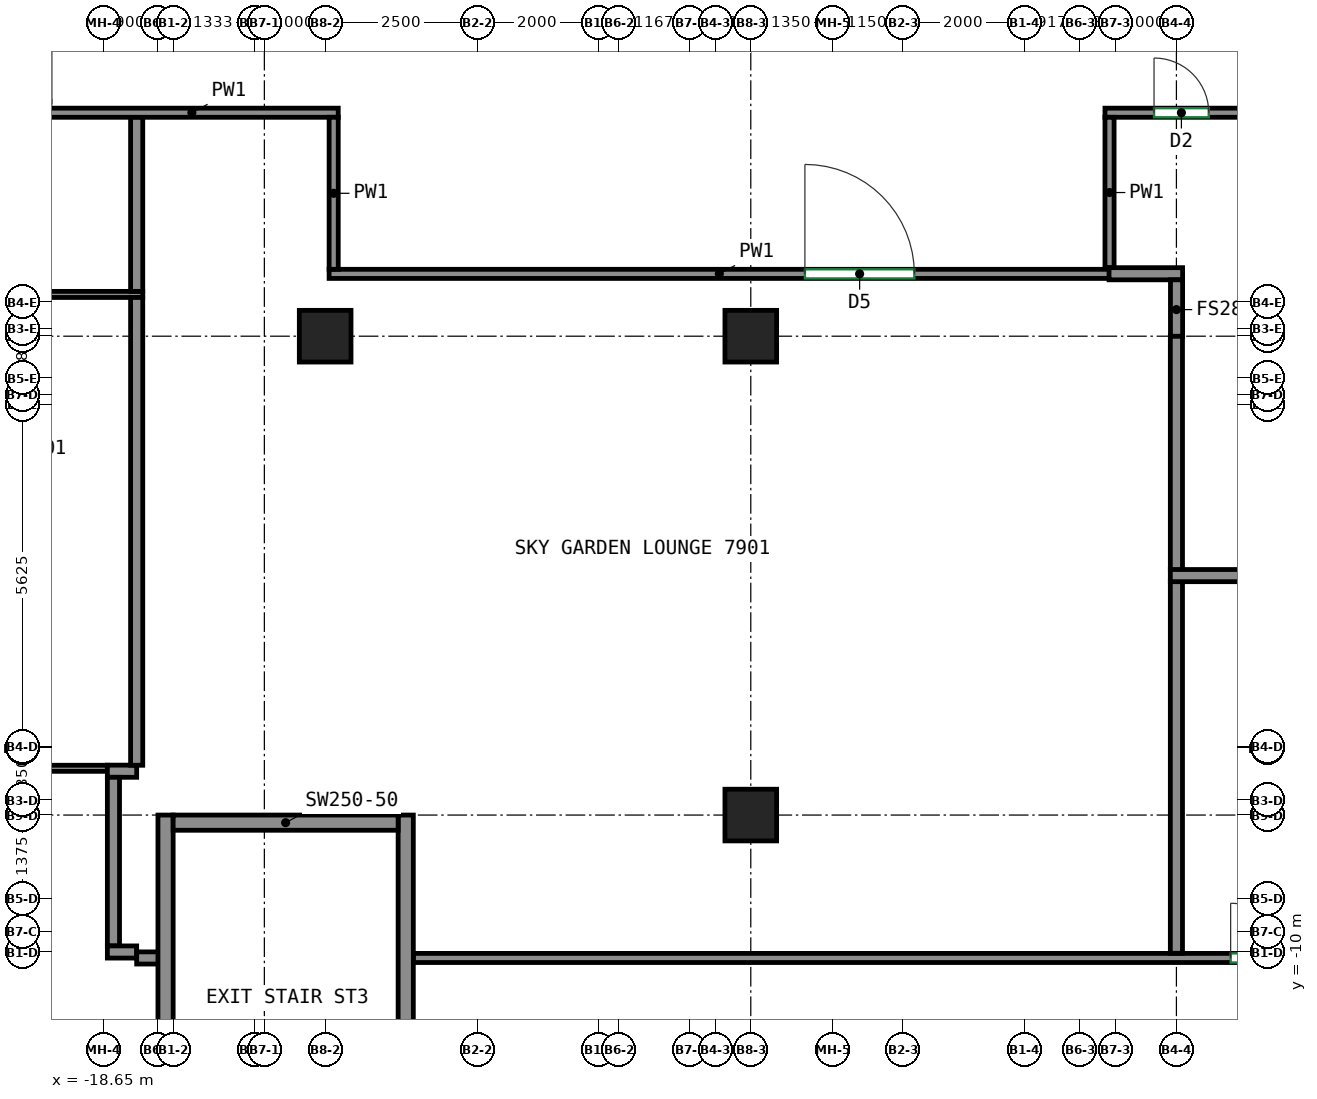
"""IFC4 building model, lengths in metres.
Left out: names, types, materials, properties, quantities, classifications, styles, units other than length and angle.
Written with IfcOpenShell. Run it as: python <this file> out.ifc"""

import sys

from ifc_helpers import new_model, si_unit, direction, frame, frame_2d, origin, origin_2d, place, context, subcontext, project, spatial, rectangle, extrude, source, transform, mapped, element, fill, save


model = new_model("IFC4")
c1 = context("Model", 3, precision=1e-05, world=origin(), true_north=direction((0.0, 1.0)))
c2 = subcontext(c1, "Body", "Model", "MODEL_VIEW")
j1 = project(units=[si_unit("LENGTHUNIT", "METRE"), si_unit("PLANEANGLEUNIT", "RADIAN")], contexts=[c1])
p1 = place(None, origin())
s1 = spatial("IfcSite", under=j1, at=p1, CompositionType="ELEMENT")
p2 = place(p1, origin())
s2 = spatial("IfcBuilding", under=s1, at=p2, CompositionType="ELEMENT")
p3 = place(p2, frame((0.0, 0.0, 315.4)))
s3 = spatial("IfcBuildingStorey", under=s2, at=p3, CompositionType="ELEMENT", Elevation=315.4)
m1 = source(origin(), c2, "Body", "SweptSolid", [
    extrude(rectangle(XDim=0.85, YDim=0.85, at=origin_2d()), origin(), (0.0, 0.0, 1.0), 3.0),
])
for number, where, z_axis, x_axis in (
    (1, (-15.0, 0.125, 0.0), (0.0, 0.0, 1.0), (1.0, 0.0, 0.0)),
    (2, (-8.0, -7.75, 0.0), (0.0, 0.0, 1.0), (1.0, 0.0, 0.0)),
    (3, (-8.0, 0.125, 0.0), (0.0, 0.0, 1.0), (1.0, 0.0, 0.0)),
):
    element("IfcColumn", number, at=place(p3, frame(where, z_axis=z_axis, x_axis=x_axis)), inside=s3, PredefinedType="COLUMN", context=c2, shape_type="MappedRepresentation", body=[
        mapped(m1, transform((0.0, 0.0, 0.0))),
    ])
m2 = source(origin(), c2, "Body", "SweptSolid", [
    extrude(rectangle(XDim=8.0, YDim=0.25, at=frame_2d((4.0, 0.0))), origin(), (0.0, 0.0, 1.0), 3.0),
])
for number, where, z_axis, x_axis in (
    (4, (-17.625, -15.75, 0.0), (0.0, 0.0, 1.0), (0.0, 1.0, 0.0)),
    (5, (-13.675, -15.75, 0.0), (0.0, 0.0, 1.0), (0.0, 1.0, 0.0)),
):
    element("IfcWall", number, at=place(p3, frame(where, z_axis=z_axis, x_axis=x_axis)), inside=s3, PredefinedType="SHEAR", context=c2, shape_type="MappedRepresentation", body=[
        mapped(m2, transform((0.0, 0.0, 0.0))),
    ])
m3 = source(origin(), c2, "Body", "SweptSolid", [
    extrude(rectangle(XDim=3.7, YDim=0.25, at=frame_2d((1.85, 0.0))), origin(), (0.0, 0.0, 1.0), 3.0),
])
p4 = place(p3, frame((-17.5, -7.875, 0.0), z_axis=(0.0, 0.0, 1.0), x_axis=(1.0, 0.0, 0.0)))
e6 = element("IfcWall", 6, at=p4, inside=s3, PredefinedType="SHEAR", context=c2, shape_type="MappedRepresentation", body=[
    mapped(m3, transform((0.0, 0.0, 0.0))),
])
p5 = place(p3, frame((-19.6, 3.8, 0.0), z_axis=(0.0, 0.0, 1.0), x_axis=(1.0, 0.0, 0.0)))
e7 = element("IfcWall", 7, at=p5, inside=s3, PredefinedType="PARTITIONING", context=c2, shape_type="SweptSolid", body=[
    extrude(rectangle(XDim=4.815, YDim=0.15, at=frame_2d((2.408, 0.0))), origin(), (0.0, 0.0, 1.0), 3.0),
])
p6 = place(p3, frame((-14.935, 1.15, 0.0), z_axis=(0.0, 0.0, 1.0), x_axis=(1.0, 0.0, 0.0)))
e8 = element("IfcWall", 8, at=p6, inside=s3, PredefinedType="PARTITIONING", context=c2, shape_type="SweptSolid", body=[
    extrude(rectangle(XDim=12.835, YDim=0.15, at=frame_2d((6.417, 0.0))), origin(), (0.0, 0.0, 1.0), 3.0),
])
p7 = place(p6, frame((7.825, 0.0, 0.0)))
e9 = element("IfcOpeningElement", 9, at=p7, cuts=e8, PredefinedType="OPENING", context=c2, shape_type="SweptSolid", body=[
    extrude(rectangle(XDim=1.8, YDim=2.1, at=frame_2d((0.9, 1.05))), frame((0.0, 0.085, 0.0), z_axis=(0.0, -1.0, 0.0), x_axis=(1.0, 0.0, 0.0)), (0.0, 0.0, 1.0), 0.17),
])
p8 = place(p3, frame((-14.86, 3.725, 0.0), z_axis=(0.0, 0.0, 1.0), x_axis=(0.0, -1.0, 0.0)))
e10 = element("IfcWall", 10, at=p8, inside=s3, PredefinedType="PARTITIONING", context=c2, shape_type="SweptSolid", body=[
    extrude(rectangle(XDim=2.5, YDim=0.15, at=frame_2d((1.25, 0.0))), origin(), (0.0, 0.0, 1.0), 3.0),
])
p9 = place(p3, frame((-13.55, -10.1, 0.0), z_axis=(0.0, 0.0, 1.0), x_axis=(1.0, 0.0, 0.0)))
e11 = element("IfcWall", 11, at=p9, inside=s3, PredefinedType="PARTITIONING", context=c2, shape_type="SweptSolid", body=[
    extrude(rectangle(XDim=30.65, YDim=0.15, at=frame_2d((15.325, 0.0))), origin(), (0.0, 0.0, 1.0), 3.0),
])
p10 = place(p9, frame((13.442, 0.0, 0.0)))
e12 = element("IfcOpeningElement", 12, at=p10, cuts=e11, PredefinedType="OPENING", context=c2, shape_type="SweptSolid", body=[
    extrude(rectangle(XDim=0.9, YDim=2.1, at=frame_2d((0.45, 1.05))), frame((0.0, 0.085, 0.0), z_axis=(0.0, -1.0, 0.0), x_axis=(1.0, 0.0, 0.0)), (0.0, 0.0, 1.0), 0.17),
])
p11 = place(p9, frame((25.452, 0.0, 0.0)))
e13 = element("IfcOpeningElement", 13, at=p11, cuts=e11, PredefinedType="OPENING", context=c2, shape_type="SweptSolid", body=[
    extrude(rectangle(XDim=0.9, YDim=2.1, at=frame_2d((0.45, 1.05))), frame((0.0, 0.085, 0.0), z_axis=(0.0, -1.0, 0.0), x_axis=(1.0, 0.0, 0.0)), (0.0, 0.0, 1.0), 0.17),
])
p12 = place(p3, frame((-2.175, 3.8, 0.0), z_axis=(0.0, 0.0, 1.0), x_axis=(1.0, 0.0, 0.0)))
e14 = element("IfcWall", 14, at=p12, inside=s3, PredefinedType="PARTITIONING", context=c2, shape_type="SweptSolid", body=[
    extrude(rectangle(XDim=9.13, YDim=0.15, at=frame_2d((4.565, 0.0))), origin(), (0.0, 0.0, 1.0), 3.0),
])
p13 = place(p12, frame((0.807, 0.0, 0.0)))
e15 = element("IfcOpeningElement", 15, at=p13, cuts=e14, PredefinedType="OPENING", context=c2, shape_type="SweptSolid", body=[
    extrude(rectangle(XDim=0.9, YDim=2.1, at=frame_2d((0.45, 1.05))), frame((0.0, 0.085, 0.0), z_axis=(0.0, -1.0, 0.0), x_axis=(1.0, 0.0, 0.0)), (0.0, 0.0, 1.0), 0.17),
])
p14 = place(p3, frame((-2.1, 1.25, 0.0), z_axis=(0.0, 0.0, 1.0), x_axis=(0.0, 1.0, 0.0)))
e16 = element("IfcWall", 16, at=p14, inside=s3, PredefinedType="PARTITIONING", context=c2, shape_type="SweptSolid", body=[
    extrude(rectangle(XDim=2.475, YDim=0.15, at=frame_2d((1.238, 0.0))), origin(), (0.0, 0.0, 1.0), 3.0),
])
p15 = place(p3, frame((-18.582, -6.981, 0.0), z_axis=(0.0, 0.0, 1.0), x_axis=(-1.0, 0.0, 0.0)))
e17 = element("IfcWall", 17, at=p15, inside=s3, PredefinedType="PARTITIONING", context=c2, shape_type="SweptSolid", body=[
    extrude(rectangle(XDim=6.668, YDim=0.1, at=frame_2d((3.334, 0.0))), origin(), (0.0, 0.0, 1.0), 3.0),
])
p16 = place(p15, frame((5.265, 0.0, 0.0)))
e18 = element("IfcOpeningElement", 18, at=p16, cuts=e17, PredefinedType="OPENING", context=c2, shape_type="SweptSolid", body=[
    extrude(rectangle(XDim=0.9, YDim=2.1, at=frame_2d((0.45, 1.05))), frame((0.0, 0.06, 0.0), z_axis=(0.0, -1.0, 0.0), x_axis=(1.0, 0.0, 0.0)), (0.0, 0.0, 1.0), 0.12),
])
p17 = place(p3, frame((-18.582, -7.029, 0.0), z_axis=(0.0, 0.0, 1.0), x_axis=(1.0, 0.0, 0.0)))
e19 = element("IfcWall", 19, at=p17, inside=s3, PredefinedType="PARTITIONING", context=c2, shape_type="SweptSolid", body=[
    extrude(rectangle(XDim=0.482, YDim=0.2, at=frame_2d((0.241, 0.0))), origin(), (0.0, 0.0, 1.0), 3.0),
])
p18 = place(p3, frame((-18.482, -9.902, 0.0), z_axis=(0.0, 0.0, 1.0), x_axis=(0.0, 1.0, 0.0)))
e20 = element("IfcWall", 20, at=p18, inside=s3, PredefinedType="PARTITIONING", context=c2, shape_type="SweptSolid", body=[
    extrude(rectangle(XDim=2.773, YDim=0.2, at=frame_2d((1.387, 0.0))), origin(), (0.0, 0.0, 1.0), 3.0),
])
p19 = place(p3, frame((-18.1, -10.002, 0.0), z_axis=(0.0, 0.0, 1.0), x_axis=(-1.0, 0.0, 0.0)))
e21 = element("IfcWall", 21, at=p19, inside=s3, PredefinedType="PARTITIONING", context=c2, shape_type="SweptSolid", body=[
    extrude(rectangle(XDim=0.482, YDim=0.2, at=frame_2d((0.241, 0.0))), origin(), (0.0, 0.0, 1.0), 3.0),
])
p20 = place(p3, frame((-17.7, -10.1, 0.0), z_axis=(0.0, 0.0, 1.0), x_axis=(-1.0, 0.0, 0.0)))
e22 = element("IfcWall", 22, at=p20, inside=s3, PredefinedType="PARTITIONING", context=c2, shape_type="SweptSolid", body=[
    extrude(rectangle(XDim=0.4, YDim=0.2, at=frame_2d((0.2, 0.0))), origin(), (0.0, 0.0, 1.0), 3.0),
])
p21 = place(p3, frame((-18.0, 0.812, 0.0), z_axis=(0.0, 0.0, 1.0), x_axis=(-1.0, 0.0, 0.0)))
e23 = element("IfcWall", 23, at=p21, inside=s3, PredefinedType="PARTITIONING", context=c2, shape_type="SweptSolid", body=[
    extrude(rectangle(XDim=7.25, YDim=0.1, at=frame_2d((3.625, 0.0))), origin(), (0.0, 0.0, 1.0), 3.0),
])
p22 = place(p21, frame((3.024, 0.0, 0.0)))
e24 = element("IfcOpeningElement", 24, at=p22, cuts=e23, PredefinedType="OPENING", context=c2, shape_type="SweptSolid", body=[
    extrude(rectangle(XDim=0.9, YDim=2.1, at=frame_2d((0.45, 1.05))), frame((0.0, 0.06, 0.0), z_axis=(0.0, -1.0, 0.0), x_axis=(1.0, 0.0, 0.0)), (0.0, 0.0, 1.0), 0.12),
])
p23 = place(p3, frame((-18.1, -6.931, 0.0), z_axis=(0.0, 0.0, 1.0), x_axis=(0.0, 1.0, 0.0)))
e25 = element("IfcWall", 25, at=p23, inside=s3, PredefinedType="PARTITIONING", context=c2, shape_type="SweptSolid", body=[
    extrude(rectangle(XDim=7.693, YDim=0.2, at=frame_2d((3.846, 0.0))), origin(), (0.0, 0.0, 1.0), 3.0),
])
p24 = place(p3, frame((-18.1, 0.862, 0.0), z_axis=(0.0, 0.0, 1.0), x_axis=(0.0, 1.0, 0.0)))
e26 = element("IfcWall", 26, at=p24, inside=s3, PredefinedType="PARTITIONING", context=c2, shape_type="SweptSolid", body=[
    extrude(rectangle(XDim=2.861, YDim=0.2, at=frame_2d((1.43, 0.0))), origin(), (0.0, 0.0, 1.0), 3.0),
])
p25 = place(p3, frame((-0.898, 1.152, 0.0), z_axis=(0.0, 0.0, 1.0), x_axis=(-1.0, 0.0, 0.0)))
e27 = element("IfcWall", 27, at=p25, inside=s3, PredefinedType="PARTITIONING", context=c2, shape_type="SweptSolid", body=[
    extrude(rectangle(XDim=1.21, YDim=0.2, at=frame_2d((0.605, 0.0))), origin(), (0.0, 0.0, 1.0), 3.0),
])
p26 = place(p3, frame((-0.998, 0.123, 0.0), z_axis=(0.0, 0.0, 1.0), x_axis=(0.0, 1.0, 0.0)))
e28 = element("IfcWall", 28, at=p26, inside=s3, PredefinedType="PARTITIONING", context=c2, shape_type="SweptSolid", body=[
    extrude(rectangle(XDim=0.929, YDim=0.2, at=frame_2d((0.464, 0.0))), origin(), (0.0, 0.0, 1.0), 3.0),
])
p27 = place(p3, frame((-1.0, -3.722, 0.0), z_axis=(0.0, 0.0, 1.0), x_axis=(0.0, 1.0, 0.0)))
e29 = element("IfcWall", 29, at=p27, inside=s3, PredefinedType="PARTITIONING", context=c2, shape_type="SweptSolid", body=[
    extrude(rectangle(XDim=3.845, YDim=0.2, at=frame_2d((1.922, 0.0))), origin(), (0.0, 0.0, 1.0), 3.0),
])
p28 = place(p3, frame((-1.0, -10.023, 0.0), z_axis=(0.0, 0.0, 1.0), x_axis=(0.0, 1.0, 0.0)))
e30 = element("IfcWall", 30, at=p28, inside=s3, PredefinedType="PARTITIONING", context=c2, shape_type="SweptSolid", body=[
    extrude(rectangle(XDim=6.121, YDim=0.2, at=frame_2d((3.061, 0.0))), origin(), (0.0, 0.0, 1.0), 3.0),
])
p29 = place(p3, frame((-1.1, -3.812, 0.0), z_axis=(0.0, 0.0, 1.0), x_axis=(1.0, 0.0, 0.0)))
e31 = element("IfcWall", 31, at=p29, inside=s3, PredefinedType="PARTITIONING", context=c2, shape_type="SweptSolid", body=[
    extrude(rectangle(XDim=14.2, YDim=0.2, at=frame_2d((7.1, 0.0))), origin(), (0.0, 0.0, 1.0), 3.0),
])
p30 = place(p10, origin())
e32 = element("IfcDoor", 32, at=p30, inside=s3, OperationType="SINGLE_SWING_LEFT", PredefinedType="DOOR", context=c2, shape_type="SweptSolid", body=[
    extrude(rectangle(XDim=0.9, YDim=2.1, at=frame_2d((0.45, 1.05))), frame((0.0, 0.025, 0.0), z_axis=(0.0, -1.0, 0.0), x_axis=(1.0, 0.0, 0.0)), (0.0, 0.0, 1.0), 0.05),
])
fill(e12, e32)
p31 = place(p7, origin())
e33 = element("IfcDoor", 33, at=p31, inside=s3, OperationType="DOUBLE_DOOR_SINGLE_SWING", PredefinedType="DOOR", context=c2, shape_type="SweptSolid", body=[
    extrude(rectangle(XDim=1.8, YDim=2.1, at=frame_2d((0.9, 1.05))), frame((0.0, 0.025, 0.0), z_axis=(0.0, -1.0, 0.0), x_axis=(1.0, 0.0, 0.0)), (0.0, 0.0, 1.0), 0.05),
])
fill(e9, e33)
p32 = place(p13, origin())
e34 = element("IfcDoor", 34, at=p32, inside=s3, OperationType="SINGLE_SWING_LEFT", PredefinedType="DOOR", context=c2, shape_type="SweptSolid", body=[
    extrude(rectangle(XDim=0.9, YDim=2.1, at=frame_2d((0.45, 1.05))), frame((0.0, 0.025, 0.0), z_axis=(0.0, -1.0, 0.0), x_axis=(1.0, 0.0, 0.0)), (0.0, 0.0, 1.0), 0.05),
])
fill(e15, e34)
save(model, sys.argv[1])
